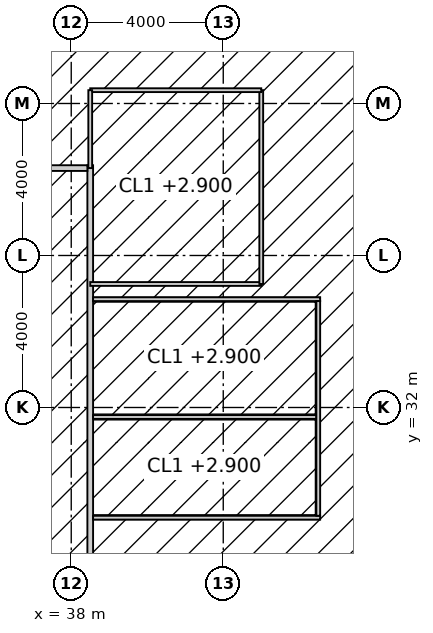
"""IFC4 building model, lengths in metres.
Left out: names, types, materials, properties, quantities, classifications, styles, units other than length and angle.
Written with IfcOpenShell. Run it as: python <this file> out.ifc"""

import sys

from ifc_helpers import new_model, si_unit, direction, frame, frame_2d, origin, place, context, subcontext, project, spatial, rectangle, extrude, element, fill, save


model = new_model("IFC4")
c1 = context("Model", 3, precision=1e-05, world=origin(), true_north=direction((0.0, 1.0)))
c2 = subcontext(c1, "Body", "Model", "MODEL_VIEW")
j1 = project(units=[si_unit("LENGTHUNIT", "METRE"), si_unit("PLANEANGLEUNIT", "RADIAN")], contexts=[c1])
p1 = place(None, origin())
s1 = spatial("IfcSite", under=j1, at=p1, CompositionType="ELEMENT")
p2 = place(p1, origin())
s2 = spatial("IfcBuilding", under=s1, at=p2, CompositionType="ELEMENT")
p3 = place(p2, frame((0.0, 0.0, 246.2)))
s3 = spatial("IfcBuildingStorey", under=s2, at=p3, CompositionType="ELEMENT", Elevation=246.2)
p4 = place(p3, frame((38.5, 15.625, 0.0), z_axis=(0.0, 0.0, 1.0), x_axis=(0.0, 1.0, 0.0)))
e1 = element("IfcWall", 1, at=p4, inside=s3, PredefinedType="PARTITIONING", context=c2, shape_type="SweptSolid", body=[
    extrude(rectangle(XDim=22.75, YDim=0.15, at=frame_2d((11.375, 0.0))), origin(), (0.0, 0.0, 1.0), 3.85),
])
p5 = place(p4, frame((10.475, 0.0, 0.0)))
e2 = element("IfcOpeningElement", 2, at=p5, cuts=e1, PredefinedType="OPENING", context=c2, shape_type="SweptSolid", body=[
    extrude(rectangle(XDim=1.8, YDim=2.4, at=frame_2d((0.9, 1.2))), frame((0.0, 0.085, 0.0), z_axis=(0.0, -1.0, 0.0), x_axis=(1.0, 0.0, 0.0)), (0.0, 0.0, 1.0), 0.17),
])
p6 = place(p3, frame((17.5, 38.3, 0.0), z_axis=(0.0, 0.0, 1.0), x_axis=(1.0, 0.0, 0.0)))
e3 = element("IfcWall", 3, at=p6, inside=s3, PredefinedType="PARTITIONING", context=c2, shape_type="SweptSolid", body=[
    extrude(rectangle(XDim=20.925, YDim=0.15, at=frame_2d((10.462, 0.0))), origin(), (0.0, 0.0, 1.0), 3.85),
])
p7 = place(p6, frame((6.25, 0.0, 0.0)))
e4 = element("IfcOpeningElement", 4, at=p7, cuts=e3, PredefinedType="OPENING", context=c2, shape_type="SweptSolid", body=[
    extrude(rectangle(XDim=0.9, YDim=2.1, at=frame_2d((0.45, 1.05))), frame((0.0, 0.085, 0.0), z_axis=(0.0, -1.0, 0.0), x_axis=(1.0, 0.0, 0.0)), (0.0, 0.0, 1.0), 0.17),
])
p8 = place(p6, frame((10.0, 0.0, 0.0)))
e5 = element("IfcOpeningElement", 5, at=p8, cuts=e3, PredefinedType="OPENING", context=c2, shape_type="SweptSolid", body=[
    extrude(rectangle(XDim=1.0, YDim=2.1, at=frame_2d((0.5, 1.05))), frame((0.0, 0.085, 0.0), z_axis=(0.0, -1.0, 0.0), x_axis=(1.0, 0.0, 0.0)), (0.0, 0.0, 1.0), 0.17),
])
p9 = place(p6, frame((13.85, 0.0, 0.0)))
e6 = element("IfcOpeningElement", 6, at=p9, cuts=e3, PredefinedType="OPENING", context=c2, shape_type="SweptSolid", body=[
    extrude(rectangle(XDim=0.9, YDim=2.1, at=frame_2d((0.45, 1.05))), frame((0.0, 0.085, 0.0), z_axis=(0.0, -1.0, 0.0), x_axis=(1.0, 0.0, 0.0)), (0.0, 0.0, 1.0), 0.17),
])
p10 = place(p3, frame((38.575, 29.1, 0.0), z_axis=(0.0, 0.0, 1.0), x_axis=(1.0, 0.0, 0.0)))
e7 = element("IfcWall", 7, at=p10, inside=s3, PredefinedType="PARTITIONING", context=c2, shape_type="SweptSolid", body=[
    extrude(rectangle(XDim=5.975, YDim=0.1, at=frame_2d((2.988, 0.0))), origin(), (0.0, 0.0, 1.0), 3.85),
])
p11 = place(p3, frame((38.575, 31.75, 0.0), z_axis=(0.0, 0.0, 1.0), x_axis=(1.0, 0.0, 0.0)))
e8 = element("IfcWall", 8, at=p11, inside=s3, PredefinedType="PARTITIONING", context=c2, shape_type="SweptSolid", body=[
    extrude(rectangle(XDim=5.875, YDim=0.1, at=frame_2d((2.938, 0.0))), origin(), (0.0, 0.0, 1.0), 3.85),
])
p12 = place(p3, frame((38.575, 34.85, 0.0), z_axis=(0.0, 0.0, 1.0), x_axis=(1.0, 0.0, 0.0)))
e9 = element("IfcWall", 9, at=p12, inside=s3, PredefinedType="PARTITIONING", context=c2, shape_type="SweptSolid", body=[
    extrude(rectangle(XDim=5.975, YDim=0.1, at=frame_2d((2.988, 0.0))), origin(), (0.0, 0.0, 1.0), 3.85),
])
p13 = place(p3, frame((44.5, 29.15, 0.0), z_axis=(0.0, 0.0, 1.0), x_axis=(0.0, 1.0, 0.0)))
e10 = element("IfcWall", 10, at=p13, inside=s3, PredefinedType="PARTITIONING", context=c2, shape_type="SweptSolid", body=[
    extrude(rectangle(XDim=5.65, YDim=0.1, at=frame_2d((2.825, 0.0))), origin(), (0.0, 0.0, 1.0), 3.85),
])
p14 = place(p13, frame((0.775, 0.0, 0.0)))
e11 = element("IfcOpeningElement", 11, at=p14, cuts=e10, PredefinedType="OPENING", context=c2, shape_type="SweptSolid", body=[
    extrude(rectangle(XDim=1.0, YDim=2.2, at=frame_2d((0.5, 1.1))), frame((0.0, 0.06, 0.0), z_axis=(0.0, -1.0, 0.0), x_axis=(1.0, 0.0, 0.0)), (0.0, 0.0, 1.0), 0.12),
])
p15 = place(p13, frame((3.65, 0.0, 0.0)))
e12 = element("IfcOpeningElement", 12, at=p15, cuts=e10, PredefinedType="OPENING", context=c2, shape_type="SweptSolid", body=[
    extrude(rectangle(XDim=1.0, YDim=2.2, at=frame_2d((0.5, 1.1))), frame((0.0, 0.06, 0.0), z_axis=(0.0, -1.0, 0.0), x_axis=(1.0, 0.0, 0.0)), (0.0, 0.0, 1.0), 0.12),
])
p16 = place(p3, frame((38.5, 35.25, 0.0), z_axis=(0.0, 0.0, 1.0), x_axis=(1.0, 0.0, 0.0)))
e13 = element("IfcWall", 13, at=p16, inside=s3, PredefinedType="PARTITIONING", context=c2, shape_type="SweptSolid", body=[
    extrude(rectangle(XDim=4.5, YDim=0.1, at=frame_2d((2.25, 0.0))), origin(), (0.0, 0.0, 1.0), 3.85),
])
p17 = place(p3, frame((43.0, 35.25, 0.0), z_axis=(0.0, 0.0, 1.0), x_axis=(0.0, 1.0, 0.0)))
e14 = element("IfcWall", 14, at=p17, inside=s3, PredefinedType="PARTITIONING", context=c2, shape_type="SweptSolid", body=[
    extrude(rectangle(XDim=5.1, YDim=0.1, at=frame_2d((2.55, 0.0))), origin(), (0.0, 0.0, 1.0), 3.85),
])
p18 = place(p17, frame((2.05, 0.0, 0.0)))
e15 = element("IfcOpeningElement", 15, at=p18, cuts=e14, PredefinedType="OPENING", context=c2, shape_type="SweptSolid", body=[
    extrude(rectangle(XDim=1.0, YDim=2.2, at=frame_2d((0.5, 1.1))), frame((0.0, 0.06, 0.0), z_axis=(0.0, -1.0, 0.0), x_axis=(1.0, 0.0, 0.0)), (0.0, 0.0, 1.0), 0.12),
])
p19 = place(p3, frame((43.0, 40.35, 0.0), z_axis=(0.0, 0.0, 1.0), x_axis=(-1.0, 0.0, 0.0)))
e16 = element("IfcWall", 16, at=p19, inside=s3, PredefinedType="PARTITIONING", context=c2, shape_type="SweptSolid", body=[
    extrude(rectangle(XDim=4.5, YDim=0.1, at=frame_2d((2.25, 0.0))), origin(), (0.0, 0.0, 1.0), 3.85),
])
p20 = place(p3, frame((38.5, 40.35, 0.0), z_axis=(0.0, 0.0, 1.0), x_axis=(0.0, -1.0, 0.0)))
e17 = element("IfcWall", 17, at=p20, inside=s3, PredefinedType="PARTITIONING", context=c2, shape_type="SweptSolid", body=[
    extrude(rectangle(XDim=2.05, YDim=0.1, at=frame_2d((1.025, 0.0))), origin(), (0.0, 0.0, 1.0), 3.85),
])
p21 = place(p14, origin())
e18 = element("IfcDoor", 18, at=p21, inside=s3, OperationType="SINGLE_SWING_LEFT", PredefinedType="DOOR", context=c2, shape_type="SweptSolid", body=[
    extrude(rectangle(XDim=1.0, YDim=2.2, at=frame_2d((0.5, 1.1))), frame((0.0, 0.025, 0.0), z_axis=(0.0, -1.0, 0.0), x_axis=(1.0, 0.0, 0.0)), (0.0, 0.0, 1.0), 0.05),
])
fill(e11, e18)
p22 = place(p15, origin())
e19 = element("IfcDoor", 19, at=p22, inside=s3, OperationType="SINGLE_SWING_LEFT", PredefinedType="DOOR", context=c2, shape_type="SweptSolid", body=[
    extrude(rectangle(XDim=1.0, YDim=2.2, at=frame_2d((0.5, 1.1))), frame((0.0, 0.025, 0.0), z_axis=(0.0, -1.0, 0.0), x_axis=(1.0, 0.0, 0.0)), (0.0, 0.0, 1.0), 0.05),
])
fill(e12, e19)
p23 = place(p18, origin())
e20 = element("IfcDoor", 20, at=p23, inside=s3, OperationType="SINGLE_SWING_RIGHT", PredefinedType="DOOR", context=c2, shape_type="SweptSolid", body=[
    extrude(rectangle(XDim=1.0, YDim=2.2, at=frame_2d((0.5, 1.1))), frame((0.0, 0.025, 0.0), z_axis=(0.0, -1.0, 0.0), x_axis=(1.0, 0.0, 0.0)), (0.0, 0.0, 1.0), 0.05),
])
fill(e15, e20)
save(model, sys.argv[1])
